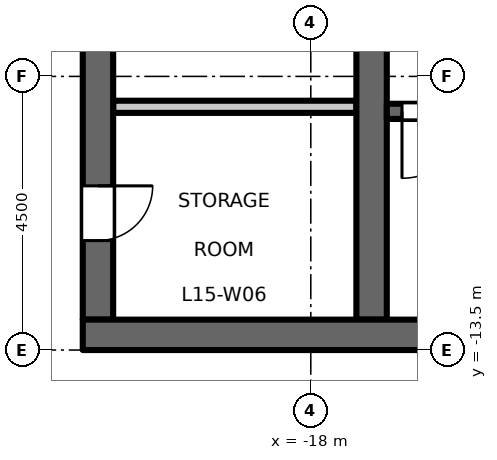
"""IFC4 building model, lengths in metres.
Left out: names, types, materials, properties, quantities, classifications, styles, units other than length and angle.
Written with IfcOpenShell. Run it as: python <this file> out.ifc"""

import sys

from ifc_helpers import new_model, si_unit, direction, frame, frame_2d, origin, place, context, subcontext, project, spatial, rectangle, extrude, element, fill, save


model = new_model("IFC4")
c1 = context("Model", 3, precision=1e-05, world=origin(), true_north=direction((0.0, 1.0)))
c2 = subcontext(c1, "Body", "Model", "MODEL_VIEW")
j1 = project(units=[si_unit("LENGTHUNIT", "METRE"), si_unit("PLANEANGLEUNIT", "RADIAN")], contexts=[c1])
p1 = place(None, origin())
s1 = spatial("IfcSite", under=j1, at=p1, CompositionType="ELEMENT")
p2 = place(p1, origin())
s2 = spatial("IfcBuilding", under=s1, at=p2, CompositionType="ELEMENT")
p3 = place(p2, frame((0.0, 0.0, 71.7)))
s3 = spatial("IfcBuildingStorey", under=s2, at=p3, CompositionType="ELEMENT", Elevation=71.7)
p4 = place(p3, frame((-21.5, -13.0, 0.0), z_axis=(0.0, 0.0, 1.0), x_axis=(0.0, 1.0, 0.0)))
e1 = element("IfcWall", 1, at=p4, inside=s3, PredefinedType="SHEAR", context=c2, shape_type="SweptSolid", body=[
    extrude(rectangle(XDim=26.0, YDim=0.5, at=frame_2d((13.0, 0.0))), origin(), (0.0, 0.0, 1.0), 4.35),
])
p5 = place(p4, frame((16.825, 0.0, 0.0)))
e2 = element("IfcOpeningElement", 2, at=p5, cuts=e1, PredefinedType="OPENING", context=c2, shape_type="SweptSolid", body=[
    extrude(rectangle(XDim=1.8, YDim=2.1, at=frame_2d((0.9, 1.05))), frame((0.0, 0.26, 0.0), z_axis=(0.0, -1.0, 0.0), x_axis=(1.0, 0.0, 0.0)), (0.0, 0.0, 1.0), 0.52),
])
p6 = place(p4, frame((7.375, 0.0, 0.0)))
e3 = element("IfcOpeningElement", 3, at=p6, cuts=e1, PredefinedType="OPENING", context=c2, shape_type="SweptSolid", body=[
    extrude(rectangle(XDim=1.8, YDim=2.1, at=frame_2d((0.9, 1.05))), frame((0.0, 0.26, 0.0), z_axis=(0.0, -1.0, 0.0), x_axis=(1.0, 0.0, 0.0)), (0.0, 0.0, 1.0), 0.52),
])
p7 = place(p4, frame((1.3, 0.0, 0.0)))
e4 = element("IfcOpeningElement", 4, at=p7, cuts=e1, PredefinedType="OPENING", context=c2, shape_type="SweptSolid", body=[
    extrude(rectangle(XDim=0.9, YDim=2.1, at=frame_2d((0.45, 1.05))), frame((0.0, 0.26, 0.0), z_axis=(0.0, -1.0, 0.0), x_axis=(1.0, 0.0, 0.0)), (0.0, 0.0, 1.0), 0.52),
])
p8 = place(p3, frame((-17.25, -9.5, 0.0), z_axis=(0.0, 0.0, 1.0), x_axis=(-1.0, 0.0, 0.0)))
e5 = element("IfcWall", 5, at=p8, inside=s3, PredefinedType="PARTITIONING", context=c2, shape_type="SweptSolid", body=[
    extrude(rectangle(XDim=4.0, YDim=0.2, at=frame_2d((2.0, 0.0))), origin(), (0.0, 0.0, 1.0), 4.35),
])
p9 = place(p3, frame((-17.0, -13.0, 0.0), z_axis=(0.0, 0.0, 1.0), x_axis=(0.0, 1.0, 0.0)))
e6 = element("IfcWall", 6, at=p9, inside=s3, PredefinedType="SHEAR", context=c2, shape_type="SweptSolid", body=[
    extrude(rectangle(XDim=6.575, YDim=0.5, at=frame_2d((3.288, 0.0))), origin(), (0.0, 0.0, 1.0), 4.35),
])
p10 = place(p3, frame((-8.75, -9.575, 0.0), z_axis=(0.0, 0.0, 1.0), x_axis=(-1.0, 0.0, 0.0)))
e7 = element("IfcWall", 7, at=p10, inside=s3, PredefinedType="SHEAR", context=c2, shape_type="SweptSolid", body=[
    extrude(rectangle(XDim=8.0, YDim=0.25, at=frame_2d((4.0, 0.0))), origin(), (0.0, 0.0, 1.0), 4.35),
])
p11 = place(p10, frame((6.65, 0.0, 0.0)))
e8 = element("IfcOpeningElement", 8, at=p11, cuts=e7, PredefinedType="OPENING", context=c2, shape_type="SweptSolid", body=[
    extrude(rectangle(XDim=1.1, YDim=2.1, at=frame_2d((0.55, 1.05))), frame((0.0, 0.135, 0.0), z_axis=(0.0, -1.0, 0.0), x_axis=(1.0, 0.0, 0.0)), (0.0, 0.0, 1.0), 0.27),
])
p12 = place(p3, frame((-8.25, -13.25, 0.0), z_axis=(0.0, 0.0, 1.0), x_axis=(-1.0, 0.0, 0.0)))
e9 = element("IfcWall", 9, at=p12, inside=s3, PredefinedType="SHEAR", context=c2, shape_type="SweptSolid", body=[
    extrude(rectangle(XDim=13.5, YDim=0.5, at=frame_2d((6.75, 0.0))), origin(), (0.0, 0.0, 1.0), 4.35),
])
p13 = place(p11, origin())
e10 = element("IfcDoor", 10, at=p13, inside=s3, OperationType="SINGLE_SWING_LEFT", PredefinedType="DOOR", context=c2, shape_type="SweptSolid", body=[
    extrude(rectangle(XDim=1.1, YDim=2.1, at=frame_2d((0.55, 1.05))), frame((0.0, 0.025, 0.0), z_axis=(0.0, -1.0, 0.0), x_axis=(1.0, 0.0, 0.0)), (0.0, 0.0, 1.0), 0.05),
])
fill(e8, e10)
p14 = place(p7, origin())
e11 = element("IfcDoor", 11, at=p14, inside=s3, OperationType="SINGLE_SWING_RIGHT", PredefinedType="DOOR", context=c2, shape_type="SweptSolid", body=[
    extrude(rectangle(XDim=0.9, YDim=2.1, at=frame_2d((0.45, 1.05))), frame((0.0, 0.025, 0.0), z_axis=(0.0, -1.0, 0.0), x_axis=(1.0, 0.0, 0.0)), (0.0, 0.0, 1.0), 0.05),
])
fill(e4, e11)
save(model, sys.argv[1])
